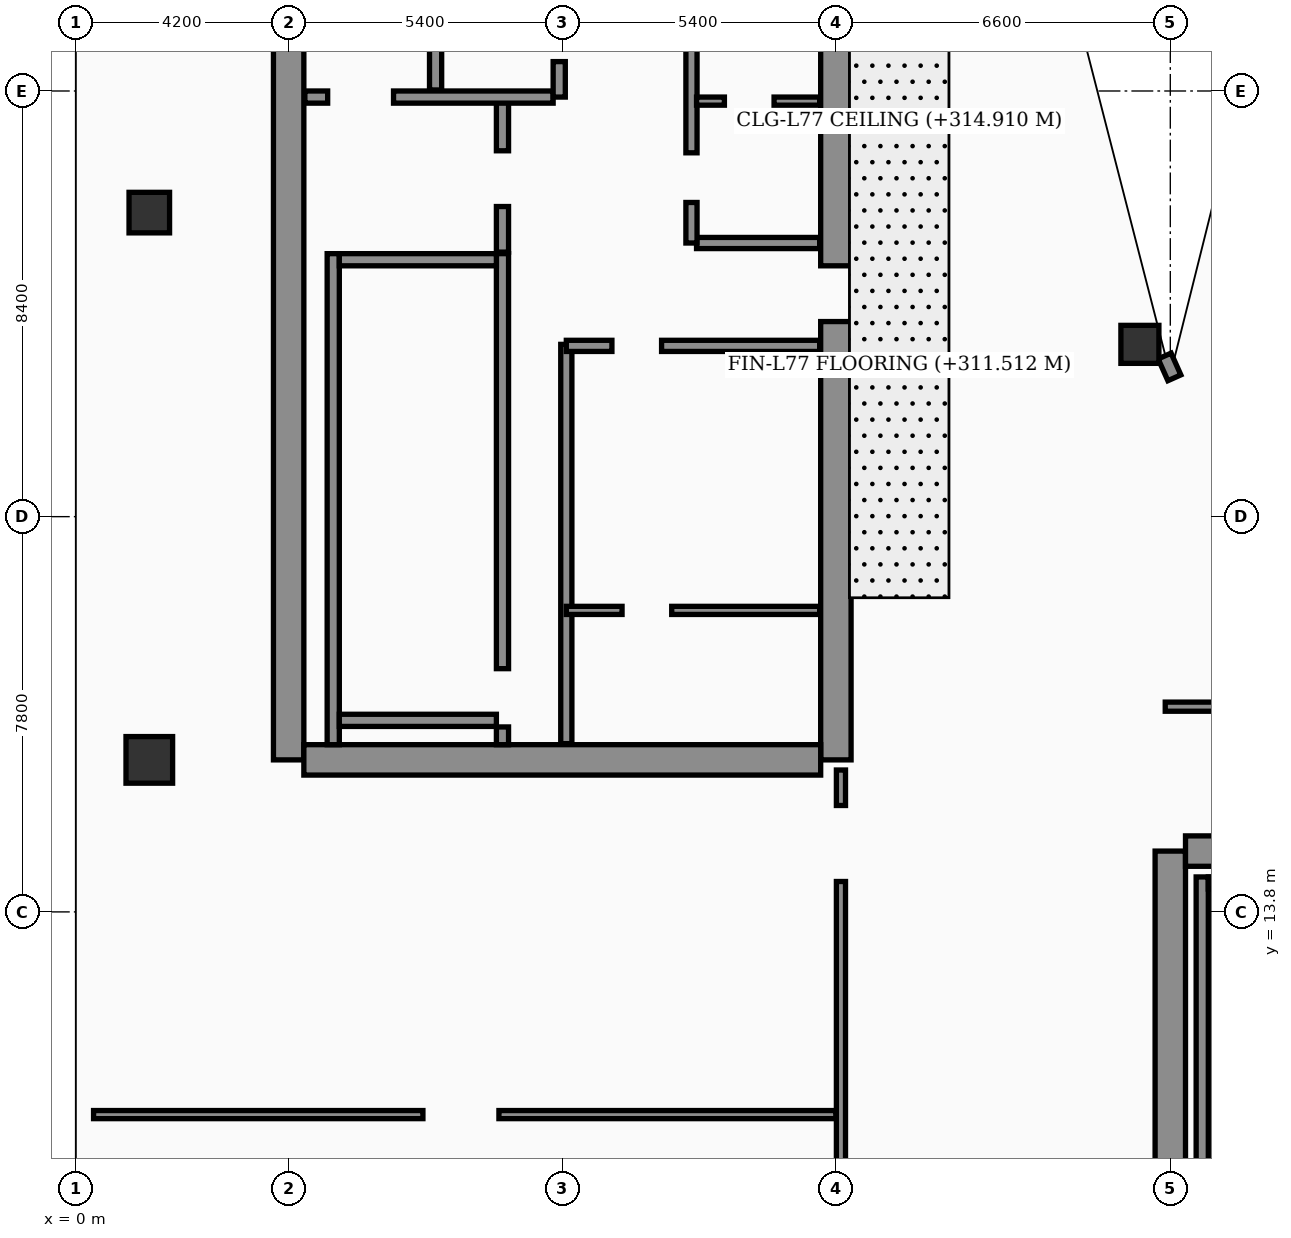
"""IFC4 building model, lengths in metres.
Left out: names, types, materials, properties, quantities, classifications, styles, units other than length and angle.
Written with IfcOpenShell. Run it as: python <this file> out.ifc"""

import sys

from ifc_helpers import new_model, si_unit, direction, frame, frame_2d, origin, origin_2d, place, context, subcontext, project, spatial, rectangle, hollow_rectangle, extrude, element, fill, save


model = new_model("IFC4")
c1 = context("Model", 3, precision=1e-05, world=origin(), true_north=direction((0.0, 1.0)))
c2 = subcontext(c1, "Body", "Model", "MODEL_VIEW")
j1 = project(units=[si_unit("LENGTHUNIT", "METRE"), si_unit("PLANEANGLEUNIT", "RADIAN")], contexts=[c1])
p1 = place(None, origin())
s1 = spatial("IfcSite", under=j1, at=p1, CompositionType="ELEMENT")
p2 = place(p1, origin())
s2 = spatial("IfcBuilding", under=s1, at=p2, CompositionType="ELEMENT")
p3 = place(p2, frame((0.0, 0.0, 311.5)))
s3 = spatial("IfcBuildingStorey", under=s2, at=p3, CompositionType="ELEMENT", Elevation=311.5)
p4 = place(p3, frame((4.2, 16.8, 0.0), z_axis=(0.0, 0.0, 1.0), x_axis=(0.0, 1.0, 0.0)))
e1 = element("IfcWall", 1, at=p4, inside=s3, PredefinedType="SHEAR", context=c2, shape_type="SweptSolid", body=[
    extrude(rectangle(XDim=21.6, YDim=0.6, at=frame_2d((10.8, 0.0))), origin(), (0.0, 0.0, 1.0), 4.26),
])
p5 = place(p3, frame((15.0, 16.8, 0.0), z_axis=(0.0, 0.0, 1.0), x_axis=(0.0, 1.0, 0.0)))
e2 = element("IfcWall", 2, at=p5, inside=s3, PredefinedType="SHEAR", context=c2, shape_type="SweptSolid", body=[
    extrude(rectangle(XDim=21.6, YDim=0.6, at=frame_2d((10.8, 0.0))), origin(), (0.0, 0.0, 1.0), 4.26),
])
p6 = place(p5, frame((8.65, 0.0, 0.0)))
e3 = element("IfcOpeningElement", 3, at=p6, cuts=e2, PredefinedType="OPENING", context=c2, shape_type="SweptSolid", body=[
    extrude(rectangle(XDim=1.1, YDim=2.2, at=frame_2d((0.55, 1.1))), frame((0.0, 0.31, 0.0), z_axis=(0.0, -1.0, 0.0), x_axis=(1.0, 0.0, 0.0)), (0.0, 0.0, 1.0), 0.62),
])
p7 = place(p5, frame((18.9, 0.0, 0.0)))
e4 = element("IfcOpeningElement", 4, at=p7, cuts=e2, PredefinedType="OPENING", context=c2, shape_type="SweptSolid", body=[
    extrude(rectangle(XDim=1.1, YDim=2.2, at=frame_2d((0.55, 1.1))), frame((0.0, 0.31, 0.0), z_axis=(0.0, -1.0, 0.0), x_axis=(1.0, 0.0, 0.0)), (0.0, 0.0, 1.0), 0.62),
])
p8 = place(p3, frame((4.5, 16.8, 0.0), z_axis=(0.0, 0.0, 1.0), x_axis=(1.0, 0.0, 0.0)))
e5 = element("IfcWall", 5, at=p8, inside=s3, PredefinedType="SHEAR", context=c2, shape_type="SweptSolid", body=[
    extrude(rectangle(XDim=10.2, YDim=0.6, at=frame_2d((5.1, 0.0))), origin(), (0.0, 0.0, 1.0), 4.26),
])
p9 = place(p3, frame((21.6, 4.6, 0.0), z_axis=(0.0, 0.0, 1.0), x_axis=(0.0, 1.0, 0.0)))
e6 = element("IfcWall", 6, at=p9, inside=s3, PredefinedType="SHEAR", context=c2, shape_type="SweptSolid", body=[
    extrude(rectangle(XDim=10.4, YDim=0.6, at=frame_2d((5.2, 0.0))), origin(), (0.0, 0.0, 1.0), 4.26),
])
p10 = place(p3, frame((21.9, 15.0, 0.0), z_axis=(0.0, 0.0, 1.0), x_axis=(1.0, 0.0, 0.0)))
e7 = element("IfcWall", 7, at=p10, inside=s3, PredefinedType="SHEAR", context=c2, shape_type="SweptSolid", body=[
    extrude(rectangle(XDim=10.2, YDim=0.6, at=frame_2d((5.1, 0.0))), origin(), (0.0, 0.0, 1.0), 4.26),
])
p11 = place(p10, frame((5.0, 0.0, 0.0)))
e8 = element("IfcOpeningElement", 8, at=p11, cuts=e7, PredefinedType="OPENING", context=c2, shape_type="SweptSolid", body=[
    extrude(rectangle(XDim=1.1, YDim=2.2, at=frame_2d((0.55, 1.1))), frame((0.0, 0.31, 0.0), z_axis=(0.0, -1.0, 0.0), x_axis=(1.0, 0.0, 0.0)), (0.0, 0.0, 1.0), 0.62),
])
p12 = place(p10, frame((8.15, 0.0, 0.0)))
e9 = element("IfcOpeningElement", 9, at=p12, cuts=e7, PredefinedType="OPENING", context=c2, shape_type="SweptSolid", body=[
    extrude(rectangle(XDim=1.3, YDim=2.35, at=frame_2d((0.65, 1.175))), frame((0.0, 0.31, 0.0), z_axis=(0.0, -1.0, 0.0), x_axis=(1.0, 0.0, 0.0)), (0.0, 0.0, 1.0), 0.62),
])
p13 = place(p3, frame((5.08, 17.1, 0.0), z_axis=(0.0, 0.0, 1.0), x_axis=(0.0, 1.0, 0.0)))
e10 = element("IfcWall", 10, at=p13, inside=s3, PredefinedType="SOLIDWALL", context=c2, shape_type="SweptSolid", body=[
    extrude(rectangle(XDim=9.69, YDim=0.24, at=frame_2d((4.845, 0.0))), origin(), (0.0, 0.0, 1.0), 4.26),
])
p14 = place(p3, frame((8.42, 17.1, 0.0), z_axis=(0.0, 0.0, 1.0), x_axis=(0.0, 1.0, 0.0)))
e11 = element("IfcWall", 11, at=p14, inside=s3, PredefinedType="SOLIDWALL", context=c2, shape_type="SweptSolid", body=[
    extrude(rectangle(XDim=9.69, YDim=0.24, at=frame_2d((4.845, 0.0))), origin(), (0.0, 0.0, 1.0), 4.26),
])
p15 = place(p14, frame((0.35, 0.0, 0.0)))
e12 = element("IfcOpeningElement", 12, at=p15, cuts=e11, PredefinedType="OPENING", context=c2, shape_type="SweptSolid", body=[
    extrude(rectangle(XDim=1.15, YDim=2.2, at=frame_2d((0.575, 1.1))), frame((0.0, 0.13, 0.0), z_axis=(0.0, -1.0, 0.0), x_axis=(1.0, 0.0, 0.0)), (0.0, 0.0, 1.0), 0.26),
])
for number, where, z_axis, x_axis in (
    (13, (5.2, 17.58, 0.0), (0.0, 0.0, 1.0), (1.0, 0.0, 0.0)),
    (14, (5.2, 26.67, 0.0), (0.0, 0.0, 1.0), (1.0, 0.0, 0.0)),
):
    element("IfcWall", number, at=place(p3, frame(where, z_axis=z_axis, x_axis=x_axis)), inside=s3, PredefinedType="SOLIDWALL", context=c2, shape_type="SweptSolid", body=[
        extrude(rectangle(XDim=3.1, YDim=0.24, at=frame_2d((1.55, 0.0))), origin(), (0.0, 0.0, 1.0), 4.26),
    ])
p16 = place(p3, frame((22.23, 4.9, 0.0), z_axis=(0.0, 0.0, 1.0), x_axis=(0.0, 1.0, 0.0)))
e15 = element("IfcWall", 15, at=p16, inside=s3, PredefinedType="SOLIDWALL", context=c2, shape_type="SweptSolid", body=[
    extrude(rectangle(XDim=9.59, YDim=0.24, at=frame_2d((4.795, 0.0))), origin(), (0.0, 0.0, 1.0), 4.26),
])
p17 = place(p3, frame((22.35, 14.37, 0.0), z_axis=(0.0, 0.0, 1.0), x_axis=(1.0, 0.0, 0.0)))
e16 = element("IfcWall", 16, at=p17, inside=s3, PredefinedType="SOLIDWALL", context=c2, shape_type="SweptSolid", body=[
    extrude(rectangle(XDim=3.1, YDim=0.24, at=frame_2d((1.55, 0.0))), origin(), (0.0, 0.0, 1.0), 4.26),
])
p18 = place(p3, frame((1.45, 16.8, 0.0), z_axis=(0.0, 0.0, 1.0), x_axis=(1.0, 0.0, 0.0)))
e17 = element("IfcColumn", 17, at=p18, inside=s3, PredefinedType="COLUMN", context=c2, shape_type="SweptSolid", body=[
    extrude(rectangle(XDim=0.92, YDim=0.92, at=origin_2d()), origin(), (0.0, 0.0, 1.0), 4.26),
])
p19 = place(p3, frame((1.45, 27.6, 0.0), z_axis=(0.0, 0.0, 1.0), x_axis=(1.0, 0.0, 0.0)))
e18 = element("IfcColumn", 18, at=p19, inside=s3, PredefinedType="COLUMN", context=c2, shape_type="SweptSolid", body=[
    extrude(rectangle(XDim=0.8, YDim=0.8, at=origin_2d()), origin(), (0.0, 0.0, 1.0), 4.26),
])
p20 = place(p3, frame((21.0, 25.0, 0.0), z_axis=(0.0, 0.0, 1.0), x_axis=(1.0, 0.0, 0.0)))
e19 = element("IfcColumn", 19, at=p20, inside=s3, PredefinedType="COLUMN", context=c2, shape_type="SweptSolid", body=[
    extrude(hollow_rectangle(XDim=0.75, YDim=0.75, WallThickness=0.032, at=origin_2d()), origin(), (0.0, 0.0, 1.0), 4.26),
])
p21 = place(p3, frame((21.68, 24.34, 0.0), z_axis=(0.0, 0.0, 1.0), x_axis=(-0.40758134973, 0.913168901875, 0.0)))
e20 = element("IfcWall", 20, at=p21, inside=s3, PredefinedType="SOLIDWALL", context=c2, shape_type="SweptSolid", body=[
    extrude(rectangle(XDim=0.471, YDim=0.28, at=frame_2d((0.235, 0.0))), origin(), (0.0, 0.0, 1.0), 4.26),
])
p22 = place(p3, frame((8.42, 26.82, 0.0), z_axis=(0.0, 0.0, 1.0), x_axis=(0.0, 1.0, 0.0)))
e21 = element("IfcWall", 21, at=p22, inside=s3, PredefinedType="SOLIDWALL", context=c2, shape_type="SweptSolid", body=[
    extrude(rectangle(XDim=3.0, YDim=0.24, at=frame_2d((1.5, 0.0))), origin(), (0.0, 0.0, 1.0), 4.26),
])
p23 = place(p22, frame((0.9, 0.0, 0.0)))
e22 = element("IfcOpeningElement", 22, at=p23, cuts=e21, PredefinedType="OPENING", context=c2, shape_type="SweptSolid", body=[
    extrude(rectangle(XDim=1.1, YDim=2.2, at=frame_2d((0.55, 1.1))), frame((0.0, 0.13, 0.0), z_axis=(0.0, -1.0, 0.0), x_axis=(1.0, 0.0, 0.0)), (0.0, 0.0, 1.0), 0.26),
])
p24 = place(p3, frame((4.52, 29.88, 0.0), z_axis=(0.0, 0.0, 1.0), x_axis=(1.0, 0.0, 0.0)))
e23 = element("IfcWall", 23, at=p24, inside=s3, PredefinedType="SOLIDWALL", context=c2, shape_type="SweptSolid", body=[
    extrude(rectangle(XDim=4.9, YDim=0.24, at=frame_2d((2.45, 0.0))), origin(), (0.0, 0.0, 1.0), 4.26),
])
p25 = place(p24, frame((0.45, 0.0, 0.0)))
e24 = element("IfcOpeningElement", 24, at=p25, cuts=e23, PredefinedType="OPENING", context=c2, shape_type="SweptSolid", body=[
    extrude(rectangle(XDim=1.3, YDim=2.35, at=frame_2d((0.65, 1.175))), frame((0.0, 0.13, 0.0), z_axis=(0.0, -1.0, 0.0), x_axis=(1.0, 0.0, 0.0)), (0.0, 0.0, 1.0), 0.26),
])
p26 = place(p3, frame((7.1, 30.02, 0.0), z_axis=(0.0, 0.0, 1.0), x_axis=(0.0, 1.0, 0.0)))
e25 = element("IfcWall", 25, at=p26, inside=s3, PredefinedType="SOLIDWALL", context=c2, shape_type="SweptSolid", body=[
    extrude(rectangle(XDim=2.63, YDim=0.24, at=frame_2d((1.315, 0.0))), origin(), (0.0, 0.0, 1.0), 4.26),
])
p27 = place(p3, frame((9.54, 29.88, 0.0), z_axis=(0.0, 0.0, 1.0), x_axis=(0.0, 1.0, 0.0)))
e26 = element("IfcWall", 26, at=p27, inside=s3, PredefinedType="SOLIDWALL", context=c2, shape_type="SweptSolid", body=[
    extrude(rectangle(XDim=2.9, YDim=0.24, at=frame_2d((1.45, 0.0))), origin(), (0.0, 0.0, 1.0), 4.26),
])
p28 = place(p27, frame((0.7, 0.0, 0.0)))
e27 = element("IfcOpeningElement", 27, at=p28, cuts=e26, PredefinedType="OPENING", context=c2, shape_type="SweptSolid", body=[
    extrude(rectangle(XDim=1.3, YDim=2.35, at=frame_2d((0.65, 1.175))), frame((0.0, 0.13, 0.0), z_axis=(0.0, -1.0, 0.0), x_axis=(1.0, 0.0, 0.0)), (0.0, 0.0, 1.0), 0.26),
])
p29 = place(p3, frame((9.68, 17.12, 0.0), z_axis=(0.0, 0.0, 1.0), x_axis=(0.0, 1.0, 0.0)))
e28 = element("IfcWall", 28, at=p29, inside=s3, PredefinedType="SOLIDWALL", context=c2, shape_type="SweptSolid", body=[
    extrude(rectangle(XDim=7.88, YDim=0.22, at=frame_2d((3.94, 0.0))), origin(), (0.0, 0.0, 1.0), 4.26),
])
p30 = place(p3, frame((9.68, 19.75, 0.0), z_axis=(0.0, 0.0, 1.0), x_axis=(1.0, 0.0, 0.0)))
e29 = element("IfcWall", 29, at=p30, inside=s3, PredefinedType="PARTITIONING", context=c2, shape_type="SweptSolid", body=[
    extrude(rectangle(XDim=5.0, YDim=0.16, at=frame_2d((2.5, 0.0))), origin(), (0.0, 0.0, 1.0), 4.26),
])
p31 = place(p30, frame((1.1, 0.0, 0.0)))
e30 = element("IfcOpeningElement", 30, at=p31, cuts=e29, PredefinedType="OPENING", context=c2, shape_type="SweptSolid", body=[
    extrude(rectangle(XDim=0.98, YDim=2.15, at=frame_2d((0.49, 1.075))), frame((0.0, 0.09, 0.0), z_axis=(0.0, -1.0, 0.0), x_axis=(1.0, 0.0, 0.0)), (0.0, 0.0, 1.0), 0.18),
])
p32 = place(p3, frame((9.68, 24.97, 0.0), z_axis=(0.0, 0.0, 1.0), x_axis=(1.0, 0.0, 0.0)))
e31 = element("IfcWall", 31, at=p32, inside=s3, PredefinedType="SOLIDWALL", context=c2, shape_type="SweptSolid", body=[
    extrude(rectangle(XDim=5.0, YDim=0.22, at=frame_2d((2.5, 0.0))), origin(), (0.0, 0.0, 1.0), 3.69),
])
p33 = place(p32, frame((0.9, 0.0, 0.0)))
e32 = element("IfcOpeningElement", 32, at=p33, cuts=e31, PredefinedType="OPENING", context=c2, shape_type="SweptSolid", body=[
    extrude(rectangle(XDim=0.98, YDim=2.15, at=frame_2d((0.49, 1.075))), frame((0.0, 0.12, 0.0), z_axis=(0.0, -1.0, 0.0), x_axis=(1.0, 0.0, 0.0)), (0.0, 0.0, 1.0), 0.24),
])
p34 = place(p3, frame((12.25, 27.0, 0.0), z_axis=(0.0, 0.0, 1.0), x_axis=(1.0, 0.0, 0.0)))
e33 = element("IfcWall", 33, at=p34, inside=s3, PredefinedType="SOLIDWALL", context=c2, shape_type="SweptSolid", body=[
    extrude(rectangle(XDim=2.43, YDim=0.22, at=frame_2d((1.215, 0.0))), origin(), (0.0, 0.0, 1.0), 4.26),
])
p35 = place(p3, frame((12.15, 27.0, 0.0), z_axis=(0.0, 0.0, 1.0), x_axis=(0.0, 1.0, 0.0)))
e34 = element("IfcWall", 34, at=p35, inside=s3, PredefinedType="SOLIDWALL", context=c2, shape_type="SweptSolid", body=[
    extrude(rectangle(XDim=7.75, YDim=0.22, at=frame_2d((3.875, 0.0))), origin(), (0.0, 0.0, 1.0), 4.26),
])
p36 = place(p35, frame((0.8, 0.0, 0.0)))
e35 = element("IfcOpeningElement", 35, at=p36, cuts=e34, PredefinedType="OPENING", context=c2, shape_type="SweptSolid", body=[
    extrude(rectangle(XDim=0.98, YDim=2.15, at=frame_2d((0.49, 1.075))), frame((0.0, 0.12, 0.0), z_axis=(0.0, -1.0, 0.0), x_axis=(1.0, 0.0, 0.0)), (0.0, 0.0, 1.0), 0.24),
])
p37 = place(p3, frame((12.25, 29.8, 0.0), z_axis=(0.0, 0.0, 1.0), x_axis=(1.0, 0.0, 0.0)))
e36 = element("IfcWall", 36, at=p37, inside=s3, PredefinedType="PARTITIONING", context=c2, shape_type="SweptSolid", body=[
    extrude(rectangle(XDim=2.43, YDim=0.16, at=frame_2d((1.215, 0.0))), origin(), (0.0, 0.0, 1.0), 4.26),
])
p38 = place(p37, frame((0.55, 0.0, 0.0)))
e37 = element("IfcOpeningElement", 37, at=p38, cuts=e36, PredefinedType="OPENING", context=c2, shape_type="SweptSolid", body=[
    extrude(rectangle(XDim=0.98, YDim=2.15, at=frame_2d((0.49, 1.075))), frame((0.0, 0.09, 0.0), z_axis=(0.0, -1.0, 0.0), x_axis=(1.0, 0.0, 0.0)), (0.0, 0.0, 1.0), 0.18),
])
p39 = place(p3, frame((0.35, 9.8, 0.0), z_axis=(0.0, 0.0, 1.0), x_axis=(1.0, 0.0, 0.0)))
e38 = element("IfcWall", 38, at=p39, inside=s3, PredefinedType="PARTITIONING", context=c2, shape_type="SweptSolid", body=[
    extrude(rectangle(XDim=14.65, YDim=0.16, at=frame_2d((7.325, 0.0))), origin(), (0.0, 0.0, 1.0), 3.69),
])
p40 = place(p39, frame((6.5, 0.0, 0.0)))
e39 = element("IfcOpeningElement", 39, at=p40, cuts=e38, PredefinedType="OPENING", context=c2, shape_type="SweptSolid", body=[
    extrude(rectangle(XDim=1.5, YDim=2.22, at=frame_2d((0.75, 1.11))), frame((0.0, 0.09, 0.0), z_axis=(0.0, -1.0, 0.0), x_axis=(1.0, 0.0, 0.0)), (0.0, 0.0, 1.0), 0.18),
])
p41 = place(p3, frame((15.1, 2.6, 0.0), z_axis=(0.0, 0.0, 1.0), x_axis=(0.0, 1.0, 0.0)))
e40 = element("IfcWall", 40, at=p41, inside=s3, PredefinedType="PARTITIONING", context=c2, shape_type="SweptSolid", body=[
    extrude(rectangle(XDim=14.0, YDim=0.18, at=frame_2d((7.0, 0.0))), origin(), (0.0, 0.0, 1.0), 3.29),
])
p42 = place(p41, frame((11.8, 0.0, 0.0)))
e41 = element("IfcOpeningElement", 41, at=p42, cuts=e40, PredefinedType="OPENING", context=c2, shape_type="SweptSolid", body=[
    extrude(rectangle(XDim=1.5, YDim=2.22, at=frame_2d((0.75, 1.11))), frame((0.0, 0.1, 0.0), z_axis=(0.0, -1.0, 0.0), x_axis=(1.0, 0.0, 0.0)), (0.0, 0.0, 1.0), 0.2),
])
p43 = place(p3, frame((21.5, 17.85, 0.0), z_axis=(0.0, 0.0, 1.0), x_axis=(1.0, 0.0, 0.0)))
e42 = element("IfcWall", 42, at=p43, inside=s3, PredefinedType="PARTITIONING", context=c2, shape_type="SweptSolid", body=[
    extrude(rectangle(XDim=12.78, YDim=0.18, at=frame_2d((6.39, 0.0))), origin(), (0.0, 0.0, 1.0), 3.69),
])
p44 = place(p43, frame((3.0, 0.0, 0.0)))
e43 = element("IfcOpeningElement", 43, at=p44, cuts=e42, PredefinedType="OPENING", context=c2, shape_type="SweptSolid", body=[
    extrude(rectangle(XDim=1.5, YDim=2.22, at=frame_2d((0.75, 1.11))), frame((0.0, 0.1, 0.0), z_axis=(0.0, -1.0, 0.0), x_axis=(1.0, 0.0, 0.0)), (0.0, 0.0, 1.0), 0.2),
])
p45 = place(p23, origin())
e44 = element("IfcDoor", 44, at=p45, inside=s3, OperationType="SINGLE_SWING_RIGHT", PredefinedType="DOOR", context=c2, shape_type="SweptSolid", body=[
    extrude(rectangle(XDim=1.1, YDim=2.2, at=frame_2d((0.55, 1.1))), frame((0.0, 0.025, 0.0), z_axis=(0.0, -1.0, 0.0), x_axis=(1.0, 0.0, 0.0)), (0.0, 0.0, 1.0), 0.05),
])
fill(e22, e44)
p46 = place(p25, origin())
e45 = element("IfcDoor", 45, at=p46, inside=s3, OperationType="DOUBLE_DOOR_SLIDING", PredefinedType="DOOR", context=c2, shape_type="SweptSolid", body=[
    extrude(rectangle(XDim=1.3, YDim=2.35, at=frame_2d((0.65, 1.175))), frame((0.0, 0.025, 0.0), z_axis=(0.0, -1.0, 0.0), x_axis=(1.0, 0.0, 0.0)), (0.0, 0.0, 1.0), 0.05),
])
fill(e24, e45)
p47 = place(p28, origin())
e46 = element("IfcDoor", 46, at=p47, inside=s3, OperationType="DOUBLE_DOOR_SLIDING", PredefinedType="DOOR", context=c2, shape_type="SweptSolid", body=[
    extrude(rectangle(XDim=1.3, YDim=2.35, at=frame_2d((0.65, 1.175))), frame((0.0, 0.025, 0.0), z_axis=(0.0, -1.0, 0.0), x_axis=(1.0, 0.0, 0.0)), (0.0, 0.0, 1.0), 0.05),
])
fill(e27, e46)
p48 = place(p31, origin())
e47 = element("IfcDoor", 47, at=p48, inside=s3, OperationType="SINGLE_SWING_LEFT", PredefinedType="DOOR", context=c2, shape_type="SweptSolid", body=[
    extrude(rectangle(XDim=0.98, YDim=2.15, at=frame_2d((0.49, 1.075))), frame((0.0, 0.025, 0.0), z_axis=(0.0, -1.0, 0.0), x_axis=(1.0, 0.0, 0.0)), (0.0, 0.0, 1.0), 0.05),
])
fill(e30, e47)
p49 = place(p33, origin())
e48 = element("IfcDoor", 48, at=p49, inside=s3, OperationType="SINGLE_SWING_RIGHT", PredefinedType="DOOR", context=c2, shape_type="SweptSolid", body=[
    extrude(rectangle(XDim=0.98, YDim=2.15, at=frame_2d((0.49, 1.075))), frame((0.0, 0.025, 0.0), z_axis=(0.0, -1.0, 0.0), x_axis=(1.0, 0.0, 0.0)), (0.0, 0.0, 1.0), 0.05),
])
fill(e32, e48)
p50 = place(p36, origin())
e49 = element("IfcDoor", 49, at=p50, inside=s3, OperationType="SINGLE_SWING_RIGHT", PredefinedType="DOOR", context=c2, shape_type="SweptSolid", body=[
    extrude(rectangle(XDim=0.98, YDim=2.15, at=frame_2d((0.49, 1.075))), frame((0.0, 0.025, 0.0), z_axis=(0.0, -1.0, 0.0), x_axis=(1.0, 0.0, 0.0)), (0.0, 0.0, 1.0), 0.05),
])
fill(e35, e49)
p51 = place(p38, origin())
e50 = element("IfcDoor", 50, at=p51, inside=s3, OperationType="SINGLE_SWING_LEFT", PredefinedType="DOOR", context=c2, shape_type="SweptSolid", body=[
    extrude(rectangle(XDim=0.98, YDim=2.15, at=frame_2d((0.49, 1.075))), frame((0.0, 0.025, 0.0), z_axis=(0.0, -1.0, 0.0), x_axis=(1.0, 0.0, 0.0)), (0.0, 0.0, 1.0), 0.05),
])
fill(e37, e50)
p52 = place(p40, origin())
e51 = element("IfcDoor", 51, at=p52, inside=s3, OperationType="SINGLE_SWING_LEFT", PredefinedType="DOOR", context=c2, shape_type="SweptSolid", body=[
    extrude(rectangle(XDim=1.5, YDim=2.22, at=frame_2d((0.75, 1.11))), frame((0.0, 0.025, 0.0), z_axis=(0.0, -1.0, 0.0), x_axis=(1.0, 0.0, 0.0)), (0.0, 0.0, 1.0), 0.05),
])
fill(e39, e51)
p53 = place(p42, origin())
e52 = element("IfcDoor", 52, at=p53, inside=s3, OperationType="SINGLE_SWING_LEFT", PredefinedType="DOOR", context=c2, shape_type="SweptSolid", body=[
    extrude(rectangle(XDim=1.5, YDim=2.22, at=frame_2d((0.75, 1.11))), frame((0.0, 0.025, 0.0), z_axis=(0.0, -1.0, 0.0), x_axis=(1.0, 0.0, 0.0)), (0.0, 0.0, 1.0), 0.05),
])
fill(e41, e52)
p54 = place(p15, origin())
e53 = element("IfcDoor", 53, at=p54, inside=s3, OperationType="SINGLE_SWING_LEFT", PredefinedType="DOOR", context=c2, shape_type="SweptSolid", body=[
    extrude(rectangle(XDim=1.15, YDim=2.2, at=frame_2d((0.575, 1.1))), frame((0.0, 0.025, 0.0), z_axis=(0.0, -1.0, 0.0), x_axis=(1.0, 0.0, 0.0)), (0.0, 0.0, 1.0), 0.05),
])
fill(e12, e53)
p55 = place(p6, origin())
e54 = element("IfcDoor", 54, at=p55, inside=s3, OperationType="SINGLE_SWING_RIGHT", PredefinedType="DOOR", context=c2, shape_type="SweptSolid", body=[
    extrude(rectangle(XDim=1.1, YDim=2.2, at=frame_2d((0.55, 1.1))), frame((0.0, 0.025, 0.0), z_axis=(0.0, -1.0, 0.0), x_axis=(1.0, 0.0, 0.0)), (0.0, 0.0, 1.0), 0.05),
])
fill(e3, e54)
save(model, sys.argv[1])
